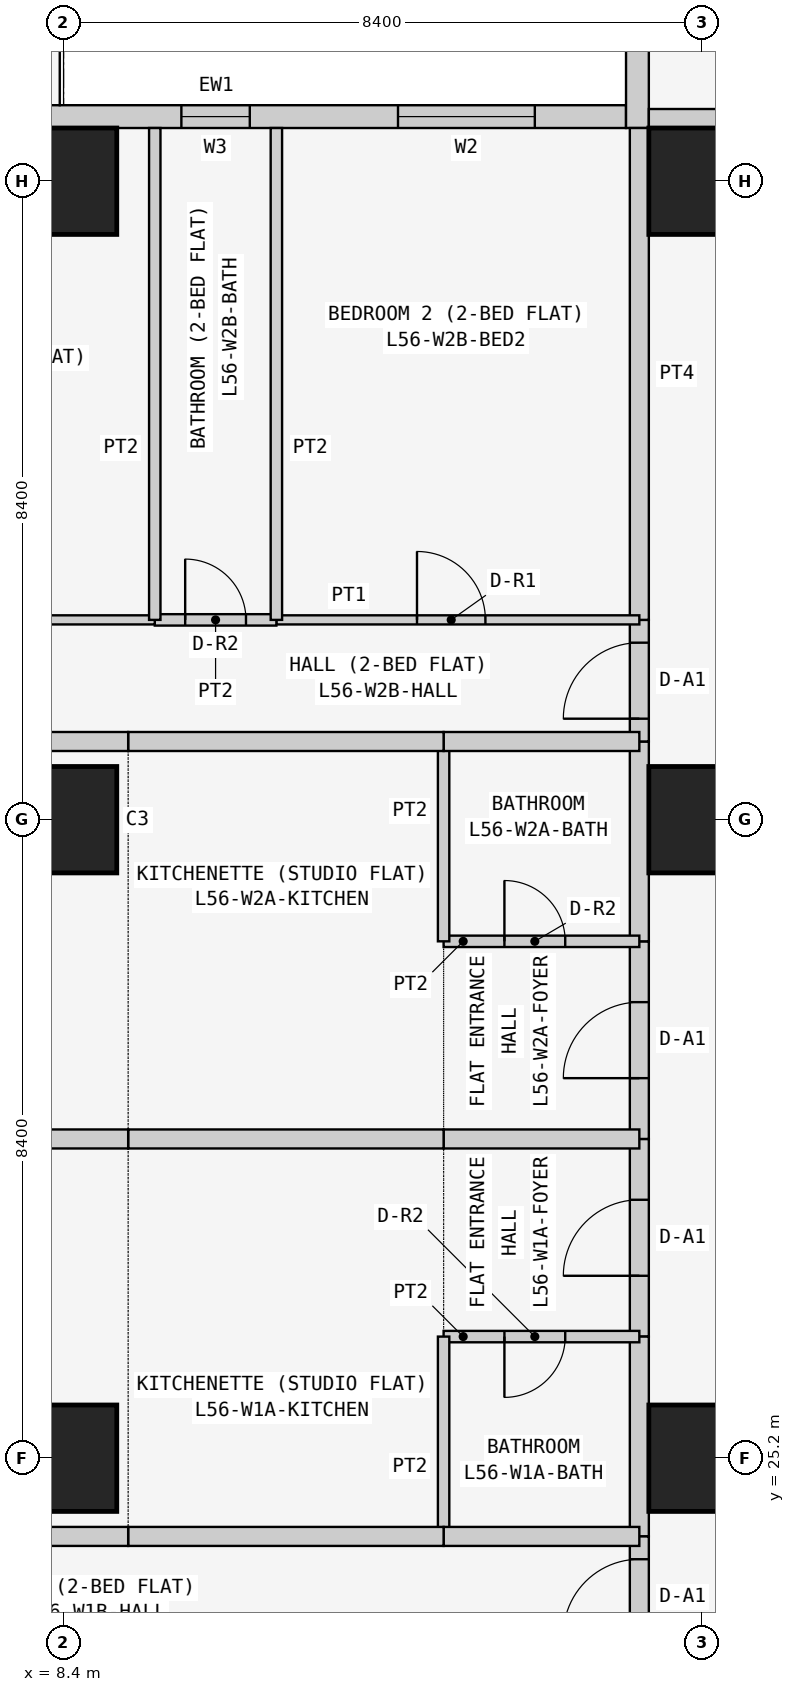
"""IFC4 building model, lengths in metres.
Left out: names, types, materials, properties, quantities, classifications, styles, units other than length and angle.
Written with IfcOpenShell. Run it as: python <this file> out.ifc"""

import sys

from ifc_helpers import new_model, si_unit, direction, frame, frame_2d, origin, origin_2d, place, context, subcontext, project, spatial, rectangle, extrude, element, fill, save


model = new_model("IFC4")
c1 = context("Model", 3, precision=1e-05, world=origin(), true_north=direction((0.0, 1.0)))
c2 = subcontext(c1, "Body", "Model", "MODEL_VIEW")
j1 = project(units=[si_unit("LENGTHUNIT", "METRE"), si_unit("PLANEANGLEUNIT", "RADIAN")], contexts=[c1])
p1 = place(None, origin())
s1 = spatial("IfcSite", under=j1, at=p1, CompositionType="ELEMENT")
p2 = place(p1, origin())
s2 = spatial("IfcBuilding", under=s1, at=p2, CompositionType="ELEMENT")
p3 = place(p2, frame((0.0, 0.0, 215.7)))
s3 = spatial("IfcBuildingStorey", under=s2, at=p3, CompositionType="ELEMENT", Elevation=215.7)
for number, where, z_axis, x_axis in (
    (1, (8.4, 25.2, 0.0), (0.0, 0.0, 1.0), (1.0, 0.0, 0.0)),
    (2, (8.4, 33.6, 0.0), (0.0, 0.0, 1.0), (1.0, 0.0, 0.0)),
    (3, (8.4, 42.0, 0.0), (0.0, 0.0, 1.0), (1.0, 0.0, 0.0)),
    (4, (16.8, 25.2, 0.0), (0.0, 0.0, 1.0), (1.0, 0.0, 0.0)),
    (5, (16.8, 33.6, 0.0), (0.0, 0.0, 1.0), (1.0, 0.0, 0.0)),
    (6, (16.8, 42.0, 0.0), (0.0, 0.0, 1.0), (1.0, 0.0, 0.0)),
):
    element("IfcColumn", number, at=place(p3, frame(where, z_axis=z_axis, x_axis=x_axis)), inside=s3, PredefinedType="COLUMN", context=c2, shape_type="SweptSolid", body=[
        extrude(rectangle(XDim=1.4, YDim=1.4, at=origin_2d()), origin(), (0.0, 0.0, 1.0), 3.6),
    ])
p4 = place(p3, frame((15.8, 42.85, 0.0), z_axis=(0.0, 0.0, 1.0), x_axis=(-1.0, 0.0, 0.0)))
e7 = element("IfcWall", 7, at=p4, inside=s3, PredefinedType="SOLIDWALL", context=c2, shape_type="SweptSolid", body=[
    extrude(rectangle(XDim=15.4, YDim=0.3, at=frame_2d((7.7, 0.0))), origin(), (0.0, 0.0, 1.0), 3.45),
])
p5 = place(p4, frame((1.2, 0.0, 0.9)))
e8 = element("IfcOpeningElement", 8, at=p5, cuts=e7, PredefinedType="OPENING", context=c2, shape_type="SweptSolid", body=[
    extrude(rectangle(XDim=1.8, YDim=1.5, at=frame_2d((0.9, 0.75))), frame((0.0, 0.16, 0.0), z_axis=(0.0, -1.0, 0.0), x_axis=(1.0, 0.0, 0.0)), (0.0, 0.0, 1.0), 0.32),
])
p6 = place(p4, frame((4.95, 0.0, 1.5)))
e9 = element("IfcOpeningElement", 9, at=p6, cuts=e7, PredefinedType="OPENING", context=c2, shape_type="SweptSolid", body=[
    extrude(rectangle(XDim=0.9, YDim=0.7, at=frame_2d((0.45, 0.35))), frame((0.0, 0.16, 0.0), z_axis=(0.0, -1.0, 0.0), x_axis=(1.0, 0.0, 0.0)), (0.0, 0.0, 1.0), 0.32),
])
p7 = place(p4, frame((8.5, 0.0, 0.9)))
e10 = element("IfcOpeningElement", 10, at=p7, cuts=e7, PredefinedType="OPENING", context=c2, shape_type="SweptSolid", body=[
    extrude(rectangle(XDim=1.8, YDim=1.5, at=frame_2d((0.9, 0.75))), frame((0.0, 0.16, 0.0), z_axis=(0.0, -1.0, 0.0), x_axis=(1.0, 0.0, 0.0)), (0.0, 0.0, 1.0), 0.32),
])
p8 = place(p4, frame((12.5, 0.0, 0.0)))
e11 = element("IfcOpeningElement", 11, at=p8, cuts=e7, PredefinedType="OPENING", context=c2, shape_type="SweptSolid", body=[
    extrude(rectangle(XDim=0.9, YDim=2.4, at=frame_2d((0.45, 1.2))), frame((0.0, 0.16, 0.0), z_axis=(0.0, -1.0, 0.0), x_axis=(1.0, 0.0, 0.0)), (0.0, 0.0, 1.0), 0.32),
])
p9 = place(p4, frame((13.5, 0.0, 0.9)))
e12 = element("IfcOpeningElement", 12, at=p9, cuts=e7, PredefinedType="OPENING", context=c2, shape_type="SweptSolid", body=[
    extrude(rectangle(XDim=1.2, YDim=1.5, at=frame_2d((0.6, 0.75))), frame((0.0, 0.16, 0.0), z_axis=(0.0, -1.0, 0.0), x_axis=(1.0, 0.0, 0.0)), (0.0, 0.0, 1.0), 0.32),
])
p10 = place(p3, frame((15.95, 50.0, 0.0), z_axis=(0.0, 0.0, 1.0), x_axis=(0.0, -1.0, 0.0)))
e13 = element("IfcWall", 13, at=p10, inside=s3, PredefinedType="SOLIDWALL", context=c2, shape_type="SweptSolid", body=[
    extrude(rectangle(XDim=7.3, YDim=0.3, at=frame_2d((3.65, 0.0))), origin(), (0.0, 0.0, 1.0), 3.45),
])
p11 = place(p10, frame((3.1, 0.0, 0.9)))
e14 = element("IfcOpeningElement", 14, at=p11, cuts=e13, PredefinedType="OPENING", context=c2, shape_type="SweptSolid", body=[
    extrude(rectangle(XDim=2.4, YDim=1.5, at=frame_2d((1.2, 0.75))), frame((0.0, 0.16, 0.0), z_axis=(0.0, -1.0, 0.0), x_axis=(1.0, 0.0, 0.0)), (0.0, 0.0, 1.0), 0.32),
])
p12 = place(p10, frame((0.75, 0.0, 0.9)))
e15 = element("IfcOpeningElement", 15, at=p12, cuts=e13, PredefinedType="OPENING", context=c2, shape_type="SweptSolid", body=[
    extrude(rectangle(XDim=1.2, YDim=1.5, at=frame_2d((0.6, 0.75))), frame((0.0, 0.16, 0.0), z_axis=(0.0, -1.0, 0.0), x_axis=(1.0, 0.0, 0.0)), (0.0, 0.0, 1.0), 0.32),
])
p13 = place(p3, frame((16.1, 42.825, 0.0), z_axis=(0.0, 0.0, 1.0), x_axis=(1.0, 0.0, 0.0)))
e16 = element("IfcWall", 16, at=p13, inside=s3, PredefinedType="PARTITIONING", context=c2, shape_type="SweptSolid", body=[
    extrude(rectangle(XDim=6.871, YDim=0.25, at=frame_2d((3.436, 0.0))), origin(), (0.0, 0.0, 1.0), 3.45),
])
p14 = place(p3, frame((15.975, 26.8, 0.0), z_axis=(0.0, 0.0, 1.0), x_axis=(0.0, 1.0, 0.0)))
e17 = element("IfcWall", 17, at=p14, inside=s3, PredefinedType="PARTITIONING", context=c2, shape_type="SweptSolid", body=[
    extrude(rectangle(XDim=2.6, YDim=0.25, at=frame_2d((1.3, 0.0))), origin(), (0.0, 0.0, 1.0), 3.45),
])
p15 = place(p14, frame((0.8, 0.0, 0.0)))
e18 = element("IfcOpeningElement", 18, at=p15, cuts=e17, PredefinedType="OPENING", context=c2, shape_type="SweptSolid", body=[
    extrude(rectangle(XDim=1.0, YDim=2.1, at=frame_2d((0.5, 1.05))), frame((0.0, 0.135, 0.0), z_axis=(0.0, -1.0, 0.0), x_axis=(1.0, 0.0, 0.0)), (0.0, 0.0, 1.0), 0.27),
])
p16 = place(p3, frame((15.975, 24.171, 0.0), z_axis=(0.0, 0.0, 1.0), x_axis=(0.0, 1.0, 0.0)))
e19 = element("IfcWall", 19, at=p16, inside=s3, PredefinedType="PARTITIONING", context=c2, shape_type="SweptSolid", body=[
    extrude(rectangle(XDim=2.629, YDim=0.25, at=frame_2d((1.314, 0.0))), origin(), (0.0, 0.0, 1.0), 3.45),
])
p17 = place(p3, frame((15.975, 22.571, 0.0), z_axis=(0.0, 0.0, 1.0), x_axis=(0.0, 1.0, 0.0)))
e20 = element("IfcWall", 20, at=p17, inside=s3, PredefinedType="PARTITIONING", context=c2, shape_type="SweptSolid", body=[
    extrude(rectangle(XDim=1.6, YDim=0.25, at=frame_2d((0.8, 0.0))), origin(), (0.0, 0.0, 1.0), 3.45),
])
p18 = place(p17, frame((0.3, 0.0, 0.0)))
e21 = element("IfcOpeningElement", 21, at=p18, cuts=e20, PredefinedType="OPENING", context=c2, shape_type="SweptSolid", body=[
    extrude(rectangle(XDim=1.0, YDim=2.1, at=frame_2d((0.5, 1.05))), frame((0.0, 0.135, 0.0), z_axis=(0.0, -1.0, 0.0), x_axis=(1.0, 0.0, 0.0)), (0.0, 0.0, 1.0), 0.27),
])
p19 = place(p3, frame((15.975, 29.4, 0.0), z_axis=(0.0, 0.0, 1.0), x_axis=(0.0, 1.0, 0.0)))
e22 = element("IfcWall", 22, at=p19, inside=s3, PredefinedType="PARTITIONING", context=c2, shape_type="SweptSolid", body=[
    extrude(rectangle(XDim=2.6, YDim=0.25, at=frame_2d((1.3, 0.0))), origin(), (0.0, 0.0, 1.0), 3.45),
])
p20 = place(p19, frame((0.8, 0.0, 0.0)))
e23 = element("IfcOpeningElement", 23, at=p20, cuts=e22, PredefinedType="OPENING", context=c2, shape_type="SweptSolid", body=[
    extrude(rectangle(XDim=1.0, YDim=2.1, at=frame_2d((0.5, 1.05))), frame((0.0, 0.135, 0.0), z_axis=(0.0, -1.0, 0.0), x_axis=(1.0, 0.0, 0.0)), (0.0, 0.0, 1.0), 0.27),
])
p21 = place(p3, frame((15.975, 32.0, 0.0), z_axis=(0.0, 0.0, 1.0), x_axis=(0.0, 1.0, 0.0)))
e24 = element("IfcWall", 24, at=p21, inside=s3, PredefinedType="PARTITIONING", context=c2, shape_type="SweptSolid", body=[
    extrude(rectangle(XDim=2.629, YDim=0.25, at=frame_2d((1.314, 0.0))), origin(), (0.0, 0.0, 1.0), 3.45),
])
p22 = place(p3, frame((15.975, 34.629, 0.0), z_axis=(0.0, 0.0, 1.0), x_axis=(0.0, 1.0, 0.0)))
e25 = element("IfcWall", 25, at=p22, inside=s3, PredefinedType="PARTITIONING", context=c2, shape_type="SweptSolid", body=[
    extrude(rectangle(XDim=1.6, YDim=0.25, at=frame_2d((0.8, 0.0))), origin(), (0.0, 0.0, 1.0), 3.45),
])
p23 = place(p22, frame((0.3, 0.0, 0.0)))
e26 = element("IfcOpeningElement", 26, at=p23, cuts=e25, PredefinedType="OPENING", context=c2, shape_type="SweptSolid", body=[
    extrude(rectangle(XDim=1.0, YDim=2.1, at=frame_2d((0.5, 1.05))), frame((0.0, 0.135, 0.0), z_axis=(0.0, -1.0, 0.0), x_axis=(1.0, 0.0, 0.0)), (0.0, 0.0, 1.0), 0.27),
])
p24 = place(p3, frame((15.975, 36.229, 0.0), z_axis=(0.0, 0.0, 1.0), x_axis=(0.0, 1.0, 0.0)))
e27 = element("IfcWall", 27, at=p24, inside=s3, PredefinedType="PARTITIONING", context=c2, shape_type="SweptSolid", body=[
    extrude(rectangle(XDim=6.471, YDim=0.25, at=frame_2d((3.235, 0.0))), origin(), (0.0, 0.0, 1.0), 3.45),
])
p25 = place(p3, frame((13.4, 26.8, 0.0), z_axis=(0.0, 0.0, 1.0), x_axis=(1.0, 0.0, 0.0)))
e28 = element("IfcWall", 28, at=p25, inside=s3, PredefinedType="PARTITIONING", context=c2, shape_type="SweptSolid", body=[
    extrude(rectangle(XDim=2.575, YDim=0.15, at=frame_2d((1.288, 0.0))), origin(), (0.0, 0.0, 1.0), 3.45),
])
p26 = place(p25, frame((0.8, 0.0, 0.0)))
e29 = element("IfcOpeningElement", 29, at=p26, cuts=e28, PredefinedType="OPENING", context=c2, shape_type="SweptSolid", body=[
    extrude(rectangle(XDim=0.8, YDim=2.1, at=frame_2d((0.4, 1.05))), frame((0.0, 0.085, 0.0), z_axis=(0.0, -1.0, 0.0), x_axis=(1.0, 0.0, 0.0)), (0.0, 0.0, 1.0), 0.17),
])
p27 = place(p3, frame((15.975, 29.4, 0.0), z_axis=(0.0, 0.0, 1.0), x_axis=(-1.0, 0.0, 0.0)))
e30 = element("IfcWall", 30, at=p27, inside=s3, PredefinedType="PARTITIONING", context=c2, shape_type="SweptSolid", body=[
    extrude(rectangle(XDim=2.575, YDim=0.25, at=frame_2d((1.288, 0.0))), origin(), (0.0, 0.0, 1.0), 3.45),
])
p28 = place(p3, frame((13.4, 26.8, 0.0), z_axis=(0.0, 0.0, 1.0), x_axis=(0.0, -1.0, 0.0)))
e31 = element("IfcWall", 31, at=p28, inside=s3, PredefinedType="PARTITIONING", context=c2, shape_type="SweptSolid", body=[
    extrude(rectangle(XDim=2.629, YDim=0.15, at=frame_2d((1.314, 0.0))), origin(), (0.0, 0.0, 1.0), 3.45),
])
p29 = place(p3, frame((13.4, 24.171, 0.0), z_axis=(0.0, 0.0, 1.0), x_axis=(1.0, 0.0, 0.0)))
e32 = element("IfcWall", 32, at=p29, inside=s3, PredefinedType="PARTITIONING", context=c2, shape_type="SweptSolid", body=[
    extrude(rectangle(XDim=2.575, YDim=0.25, at=frame_2d((1.288, 0.0))), origin(), (0.0, 0.0, 1.0), 3.45),
])
for number, where, z_axis, x_axis in (
    (33, (9.25, 24.171, 0.0), (0.0, 0.0, 1.0), (1.0, 0.0, 0.0)),
    (34, (13.4, 29.4, 0.0), (0.0, 0.0, 1.0), (-1.0, 0.0, 0.0)),
):
    element("IfcWall", number, at=place(p3, frame(where, z_axis=z_axis, x_axis=x_axis)), inside=s3, PredefinedType="PARTITIONING", context=c2, shape_type="SweptSolid", body=[
        extrude(rectangle(XDim=4.15, YDim=0.25, at=frame_2d((2.075, 0.0))), origin(), (0.0, 0.0, 1.0), 3.45),
    ])
p30 = place(p3, frame((3.5, 24.171, 0.0), z_axis=(0.0, 0.0, 1.0), x_axis=(1.0, 0.0, 0.0)))
e35 = element("IfcWall", 35, at=p30, inside=s3, PredefinedType="PARTITIONING", context=c2, shape_type="SweptSolid", body=[
    extrude(rectangle(XDim=5.75, YDim=0.25, at=frame_2d((2.875, 0.0))), origin(), (0.0, 0.0, 1.0), 3.45),
])
p31 = place(p3, frame((9.25, 29.4, 0.0), z_axis=(0.0, 0.0, 1.0), x_axis=(-1.0, 0.0, 0.0)))
e36 = element("IfcWall", 36, at=p31, inside=s3, PredefinedType="PARTITIONING", context=c2, shape_type="SweptSolid", body=[
    extrude(rectangle(XDim=9.9, YDim=0.25, at=frame_2d((4.95, 0.0))), origin(), (0.0, 0.0, 1.0), 3.45),
])
p32 = place(p3, frame((13.4, 32.0, 0.0), z_axis=(0.0, 0.0, 1.0), x_axis=(1.0, 0.0, 0.0)))
e37 = element("IfcWall", 37, at=p32, inside=s3, PredefinedType="PARTITIONING", context=c2, shape_type="SweptSolid", body=[
    extrude(rectangle(XDim=2.575, YDim=0.15, at=frame_2d((1.288, 0.0))), origin(), (0.0, 0.0, 1.0), 3.45),
])
p33 = place(p32, frame((0.8, 0.0, 0.0)))
e38 = element("IfcOpeningElement", 38, at=p33, cuts=e37, PredefinedType="OPENING", context=c2, shape_type="SweptSolid", body=[
    extrude(rectangle(XDim=0.8, YDim=2.1, at=frame_2d((0.4, 1.05))), frame((0.0, 0.085, 0.0), z_axis=(0.0, -1.0, 0.0), x_axis=(1.0, 0.0, 0.0)), (0.0, 0.0, 1.0), 0.17),
])
p34 = place(p3, frame((13.4, 32.0, 0.0), z_axis=(0.0, 0.0, 1.0), x_axis=(0.0, 1.0, 0.0)))
e39 = element("IfcWall", 39, at=p34, inside=s3, PredefinedType="PARTITIONING", context=c2, shape_type="SweptSolid", body=[
    extrude(rectangle(XDim=2.629, YDim=0.15, at=frame_2d((1.314, 0.0))), origin(), (0.0, 0.0, 1.0), 3.45),
])
p35 = place(p3, frame((13.4, 34.629, 0.0), z_axis=(0.0, 0.0, 1.0), x_axis=(1.0, 0.0, 0.0)))
e40 = element("IfcWall", 40, at=p35, inside=s3, PredefinedType="PARTITIONING", context=c2, shape_type="SweptSolid", body=[
    extrude(rectangle(XDim=2.575, YDim=0.25, at=frame_2d((1.288, 0.0))), origin(), (0.0, 0.0, 1.0), 3.45),
])
p36 = place(p3, frame((9.25, 34.629, 0.0), z_axis=(0.0, 0.0, 1.0), x_axis=(1.0, 0.0, 0.0)))
e41 = element("IfcWall", 41, at=p36, inside=s3, PredefinedType="PARTITIONING", context=c2, shape_type="SweptSolid", body=[
    extrude(rectangle(XDim=4.15, YDim=0.25, at=frame_2d((2.075, 0.0))), origin(), (0.0, 0.0, 1.0), 3.45),
])
p37 = place(p3, frame((3.5, 34.629, 0.0), z_axis=(0.0, 0.0, 1.0), x_axis=(1.0, 0.0, 0.0)))
e42 = element("IfcWall", 42, at=p37, inside=s3, PredefinedType="PARTITIONING", context=c2, shape_type="SweptSolid", body=[
    extrude(rectangle(XDim=5.75, YDim=0.25, at=frame_2d((2.875, 0.0))), origin(), (0.0, 0.0, 1.0), 3.45),
])
p38 = place(p3, frame((11.2, 36.229, 0.0), z_axis=(0.0, 0.0, 1.0), x_axis=(1.0, 0.0, 0.0)))
e43 = element("IfcWall", 43, at=p38, inside=s3, PredefinedType="PARTITIONING", context=c2, shape_type="SweptSolid", body=[
    extrude(rectangle(XDim=4.775, YDim=0.12, at=frame_2d((2.388, 0.0))), origin(), (0.0, 0.0, 1.0), 3.45),
])
p39 = place(p38, frame((1.85, 0.0, 0.0)))
e44 = element("IfcOpeningElement", 44, at=p39, cuts=e43, PredefinedType="OPENING", context=c2, shape_type="SweptSolid", body=[
    extrude(rectangle(XDim=0.9, YDim=2.1, at=frame_2d((0.45, 1.05))), frame((0.0, 0.07, 0.0), z_axis=(0.0, -1.0, 0.0), x_axis=(1.0, 0.0, 0.0)), (0.0, 0.0, 1.0), 0.14),
])
p40 = place(p3, frame((9.6, 36.229, 0.0), z_axis=(0.0, 0.0, 1.0), x_axis=(1.0, 0.0, 0.0)))
e45 = element("IfcWall", 45, at=p40, inside=s3, PredefinedType="PARTITIONING", context=c2, shape_type="SweptSolid", body=[
    extrude(rectangle(XDim=1.6, YDim=0.15, at=frame_2d((0.8, 0.0))), origin(), (0.0, 0.0, 1.0), 3.45),
])
p41 = place(p40, frame((0.4, 0.0, 0.0)))
e46 = element("IfcOpeningElement", 46, at=p41, cuts=e45, PredefinedType="OPENING", context=c2, shape_type="SweptSolid", body=[
    extrude(rectangle(XDim=0.8, YDim=2.1, at=frame_2d((0.4, 1.05))), frame((0.0, 0.085, 0.0), z_axis=(0.0, -1.0, 0.0), x_axis=(1.0, 0.0, 0.0)), (0.0, 0.0, 1.0), 0.17),
])
p42 = place(p3, frame((4.7, 36.229, 0.0), z_axis=(0.0, 0.0, 1.0), x_axis=(1.0, 0.0, 0.0)))
e47 = element("IfcWall", 47, at=p42, inside=s3, PredefinedType="PARTITIONING", context=c2, shape_type="SweptSolid", body=[
    extrude(rectangle(XDim=4.9, YDim=0.12, at=frame_2d((2.45, 0.0))), origin(), (0.0, 0.0, 1.0), 3.45),
])
p43 = place(p42, frame((1.65, 0.0, 0.0)))
e48 = element("IfcOpeningElement", 48, at=p43, cuts=e47, PredefinedType="OPENING", context=c2, shape_type="SweptSolid", body=[
    extrude(rectangle(XDim=0.9, YDim=2.1, at=frame_2d((0.45, 1.05))), frame((0.0, 0.07, 0.0), z_axis=(0.0, -1.0, 0.0), x_axis=(1.0, 0.0, 0.0)), (0.0, 0.0, 1.0), 0.14),
])
for number, where, z_axis, x_axis in (
    (49, (11.2, 36.229, 0.0), (0.0, 0.0, 1.0), (0.0, 1.0, 0.0)),
    (50, (9.6, 36.229, 0.0), (0.0, 0.0, 1.0), (0.0, 1.0, 0.0)),
):
    element("IfcWall", number, at=place(p3, frame(where, z_axis=z_axis, x_axis=x_axis)), inside=s3, PredefinedType="PARTITIONING", context=c2, shape_type="SweptSolid", body=[
        extrude(rectangle(XDim=6.471, YDim=0.15, at=frame_2d((3.235, 0.0))), origin(), (0.0, 0.0, 1.0), 3.45),
    ])
p44 = place(p5, origin())
e51 = element("IfcWindow", 51, at=p44, inside=s3, PartitioningType="SINGLE_PANEL", PredefinedType="WINDOW", context=c2, shape_type="SweptSolid", body=[
    extrude(rectangle(XDim=1.8, YDim=1.5, at=frame_2d((0.9, 0.75))), frame((0.0, 0.03, 0.0), z_axis=(0.0, -1.0, 0.0), x_axis=(1.0, 0.0, 0.0)), (0.0, 0.0, 1.0), 0.06),
])
fill(e8, e51)
p45 = place(p6, origin())
e52 = element("IfcWindow", 52, at=p45, inside=s3, PartitioningType="SINGLE_PANEL", PredefinedType="WINDOW", context=c2, shape_type="SweptSolid", body=[
    extrude(rectangle(XDim=0.9, YDim=0.7, at=frame_2d((0.45, 0.35))), frame((0.0, 0.03, 0.0), z_axis=(0.0, -1.0, 0.0), x_axis=(1.0, 0.0, 0.0)), (0.0, 0.0, 1.0), 0.06),
])
fill(e9, e52)
p46 = place(p15, origin())
e53 = element("IfcDoor", 53, at=p46, inside=s3, OperationType="SINGLE_SWING_LEFT", PredefinedType="DOOR", context=c2, shape_type="SweptSolid", body=[
    extrude(rectangle(XDim=1.0, YDim=2.1, at=frame_2d((0.5, 1.05))), frame((0.0, 0.025, 0.0), z_axis=(0.0, -1.0, 0.0), x_axis=(1.0, 0.0, 0.0)), (0.0, 0.0, 1.0), 0.05),
])
fill(e18, e53)
p47 = place(p26, frame((0.8, 0.0, 0.0), z_axis=(0.0, 0.0, 1.0), x_axis=(-1.0, 0.0, 0.0)))
e54 = element("IfcDoor", 54, at=p47, inside=s3, OperationType="SINGLE_SWING_RIGHT", PredefinedType="DOOR", context=c2, shape_type="SweptSolid", body=[
    extrude(rectangle(XDim=0.8, YDim=2.1, at=frame_2d((0.4, 1.05))), frame((0.0, 0.025, 0.0), z_axis=(0.0, -1.0, 0.0), x_axis=(1.0, 0.0, 0.0)), (0.0, 0.0, 1.0), 0.05),
])
fill(e29, e54)
p48 = place(p18, origin())
e55 = element("IfcDoor", 55, at=p48, inside=s3, OperationType="SINGLE_SWING_LEFT", PredefinedType="DOOR", context=c2, shape_type="SweptSolid", body=[
    extrude(rectangle(XDim=1.0, YDim=2.1, at=frame_2d((0.5, 1.05))), frame((0.0, 0.025, 0.0), z_axis=(0.0, -1.0, 0.0), x_axis=(1.0, 0.0, 0.0)), (0.0, 0.0, 1.0), 0.05),
])
fill(e21, e55)
p49 = place(p20, origin())
e56 = element("IfcDoor", 56, at=p49, inside=s3, OperationType="SINGLE_SWING_LEFT", PredefinedType="DOOR", context=c2, shape_type="SweptSolid", body=[
    extrude(rectangle(XDim=1.0, YDim=2.1, at=frame_2d((0.5, 1.05))), frame((0.0, 0.025, 0.0), z_axis=(0.0, -1.0, 0.0), x_axis=(1.0, 0.0, 0.0)), (0.0, 0.0, 1.0), 0.05),
])
fill(e23, e56)
p50 = place(p33, origin())
e57 = element("IfcDoor", 57, at=p50, inside=s3, OperationType="SINGLE_SWING_LEFT", PredefinedType="DOOR", context=c2, shape_type="SweptSolid", body=[
    extrude(rectangle(XDim=0.8, YDim=2.1, at=frame_2d((0.4, 1.05))), frame((0.0, 0.025, 0.0), z_axis=(0.0, -1.0, 0.0), x_axis=(1.0, 0.0, 0.0)), (0.0, 0.0, 1.0), 0.05),
])
fill(e38, e57)
p51 = place(p23, origin())
e58 = element("IfcDoor", 58, at=p51, inside=s3, OperationType="SINGLE_SWING_LEFT", PredefinedType="DOOR", context=c2, shape_type="SweptSolid", body=[
    extrude(rectangle(XDim=1.0, YDim=2.1, at=frame_2d((0.5, 1.05))), frame((0.0, 0.025, 0.0), z_axis=(0.0, -1.0, 0.0), x_axis=(1.0, 0.0, 0.0)), (0.0, 0.0, 1.0), 0.05),
])
fill(e26, e58)
p52 = place(p39, origin())
e59 = element("IfcDoor", 59, at=p52, inside=s3, OperationType="SINGLE_SWING_LEFT", PredefinedType="DOOR", context=c2, shape_type="SweptSolid", body=[
    extrude(rectangle(XDim=0.9, YDim=2.1, at=frame_2d((0.45, 1.05))), frame((0.0, 0.025, 0.0), z_axis=(0.0, -1.0, 0.0), x_axis=(1.0, 0.0, 0.0)), (0.0, 0.0, 1.0), 0.05),
])
fill(e44, e59)
p53 = place(p41, origin())
e60 = element("IfcDoor", 60, at=p53, inside=s3, OperationType="SINGLE_SWING_LEFT", PredefinedType="DOOR", context=c2, shape_type="SweptSolid", body=[
    extrude(rectangle(XDim=0.8, YDim=2.1, at=frame_2d((0.4, 1.05))), frame((0.0, 0.025, 0.0), z_axis=(0.0, -1.0, 0.0), x_axis=(1.0, 0.0, 0.0)), (0.0, 0.0, 1.0), 0.05),
])
fill(e46, e60)
save(model, sys.argv[1])
